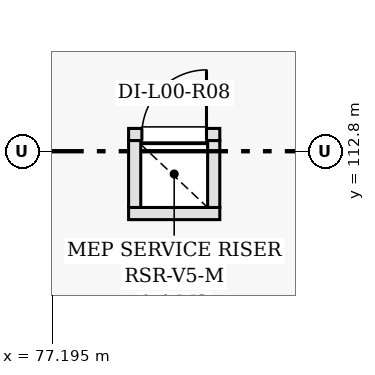
"""IFC4 building model, lengths in metres.
Left out: names, types, materials, properties, quantities, classifications, styles, units other than length and angle.
Written with IfcOpenShell. Run it as: python <this file> out.ifc"""

import sys

from ifc_helpers import new_model, si_unit, direction, frame, frame_2d, origin, place, context, subcontext, project, spatial, rectangle, extrude, element, fill, save


model = new_model("IFC4")
c1 = context("Model", 3, precision=1e-05, world=origin(), true_north=direction((0.0, 1.0)))
c2 = subcontext(c1, "Body", "Model", "MODEL_VIEW")
j1 = project(units=[si_unit("LENGTHUNIT", "METRE"), si_unit("PLANEANGLEUNIT", "RADIAN")], contexts=[c1])
p1 = place(None, origin())
s1 = spatial("IfcSite", under=j1, at=p1, CompositionType="ELEMENT")
p2 = place(p1, origin())
s2 = spatial("IfcBuilding", under=s1, at=p2, CompositionType="ELEMENT")
p3 = place(p2, origin())
s3 = spatial("IfcBuildingStorey", under=s2, at=p3, CompositionType="ELEMENT", Elevation=0.0)
p4 = place(p3, frame((78.2, 111.98, 0.0), z_axis=(0.0, 0.0, 1.0), x_axis=(1.0, 0.0, 0.0)))
e1 = element("IfcWall", 1, at=p4, inside=s3, PredefinedType="PARTITIONING", context=c2, shape_type="SweptSolid", body=[
    extrude(rectangle(XDim=1.2, YDim=0.16, at=frame_2d((0.6, 0.0))), origin(), (0.0, 0.0, 1.0), 4.52),
])
p5 = place(p3, frame((78.2, 113.02, 0.0), z_axis=(0.0, 0.0, 1.0), x_axis=(1.0, 0.0, 0.0)))
e2 = element("IfcWall", 2, at=p5, inside=s3, PredefinedType="PARTITIONING", context=c2, shape_type="SweptSolid", body=[
    extrude(rectangle(XDim=1.2, YDim=0.16, at=frame_2d((0.6, 0.0))), origin(), (0.0, 0.0, 1.0), 4.52),
])
p6 = place(p5, frame((0.175, 0.0, 0.0)))
e3 = element("IfcOpeningElement", 3, at=p6, cuts=e2, PredefinedType="OPENING", context=c2, shape_type="SweptSolid", body=[
    extrude(rectangle(XDim=0.85, YDim=2.02, at=frame_2d((0.425, 1.01))), frame((0.0, 0.09, 0.0), z_axis=(0.0, -1.0, 0.0), x_axis=(1.0, 0.0, 0.0)), (0.0, 0.0, 1.0), 0.18),
])
for number, where, z_axis, x_axis in (
    (4, (78.28, 112.06, 0.0), (0.0, 0.0, 1.0), (0.0, 1.0, 0.0)),
    (5, (79.32, 112.06, 0.0), (0.0, 0.0, 1.0), (0.0, 1.0, 0.0)),
):
    element("IfcWall", number, at=place(p3, frame(where, z_axis=z_axis, x_axis=x_axis)), inside=s3, PredefinedType="PARTITIONING", context=c2, shape_type="SweptSolid", body=[
        extrude(rectangle(XDim=0.88, YDim=0.16, at=frame_2d((0.44, 0.0))), origin(), (0.0, 0.0, 1.0), 4.52),
    ])
p7 = place(p6, origin())
e6 = element("IfcDoor", 6, at=p7, inside=s3, OperationType="SINGLE_SWING_RIGHT", PredefinedType="DOOR", context=c2, shape_type="SweptSolid", body=[
    extrude(rectangle(XDim=0.85, YDim=2.02, at=frame_2d((0.425, 1.01))), frame((0.0, 0.025, 0.0), z_axis=(0.0, -1.0, 0.0), x_axis=(1.0, 0.0, 0.0)), (0.0, 0.0, 1.0), 0.05),
])
fill(e3, e6)
save(model, sys.argv[1])
